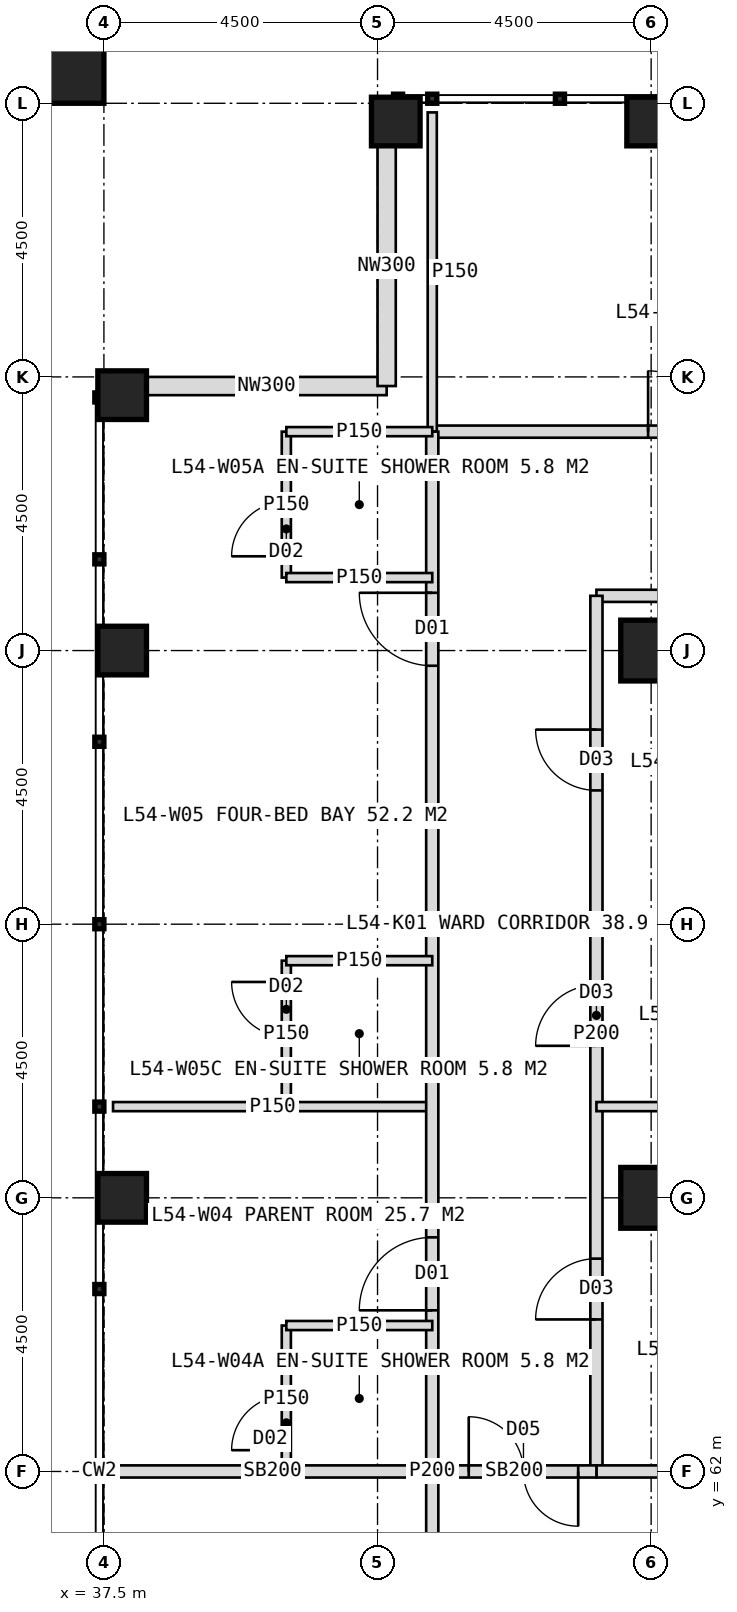
"""IFC4 building model, lengths in metres.
Left out: names, types, materials, properties, quantities, classifications, styles, units other than length and angle.
Written with IfcOpenShell. Run it as: python <this file> out.ifc"""

import sys

from ifc_helpers import new_model, si_unit, direction, frame, frame_2d, origin, origin_2d, place, context, subcontext, project, spatial, rectangle, hollow_rectangle, extrude, element, fill, save


model = new_model("IFC4")
c1 = context("Model", 3, precision=1e-05, world=origin(), true_north=direction((0.0, 1.0)))
c2 = subcontext(c1, "Body", "Model", "MODEL_VIEW")
j1 = project(units=[si_unit("LENGTHUNIT", "METRE"), si_unit("PLANEANGLEUNIT", "RADIAN")], contexts=[c1])
p1 = place(None, origin())
s1 = spatial("IfcSite", under=j1, at=p1, CompositionType="ELEMENT")
p2 = place(p1, origin())
s2 = spatial("IfcBuilding", under=s1, at=p2, CompositionType="ELEMENT")
p3 = place(p2, frame((0.0, 0.0, 225.0)))
s3 = spatial("IfcBuildingStorey", under=s2, at=p3, CompositionType="ELEMENT", Elevation=225.0)
for number, where, z_axis, x_axis in (
    (1, (46.5, 75.5, 0.0), (0.0, 0.0, 1.0), (1.0, 0.0, 0.0)),
    (2, (46.5, 66.5, 0.0), (0.0, 0.0, 1.0), (1.0, 0.0, 0.0)),
):
    element("IfcColumn", number, at=place(p3, frame(where, z_axis=z_axis, x_axis=x_axis)), inside=s3, PredefinedType="COLUMN", context=c2, shape_type="SweptSolid", body=[
        extrude(hollow_rectangle(XDim=1.0, YDim=1.0, WallThickness=0.1, at=origin_2d()), origin(), (0.0, 0.0, 1.0), 4.0),
    ])
for number, where, z_axis, x_axis in (
    (3, (42.3, 84.2, 0.0), (0.0, 0.0, 1.0), (1.0, 0.0, 0.0)),
    (4, (46.5, 84.2, 0.0), (0.0, 0.0, 1.0), (1.0, 0.0, 0.0)),
    (5, (37.8, 66.5, 0.0), (0.0, 0.0, 1.0), (1.0, 0.0, 0.0)),
    (6, (37.8, 75.5, 0.0), (0.0, 0.0, 1.0), (1.0, 0.0, 0.0)),
    (7, (37.8, 79.7, 0.0), (0.0, 0.0, 1.0), (1.0, 0.0, 0.0)),
):
    element("IfcColumn", number, at=place(p3, frame(where, z_axis=z_axis, x_axis=x_axis)), inside=s3, PredefinedType="COLUMN", context=c2, shape_type="SweptSolid", body=[
        extrude(hollow_rectangle(XDim=0.8, YDim=0.8, WallThickness=0.08, at=origin_2d()), origin(), (0.0, 0.0, 1.0), 4.0),
    ])
p4 = place(p3, frame((36.9, 85.1, 0.0), z_axis=(0.0, 0.0, 1.0), x_axis=(1.0, 0.0, 0.0)))
e8 = element("IfcColumn", 8, at=p4, inside=s3, PredefinedType="COLUMN", context=c2, shape_type="SweptSolid", body=[
    extrude(hollow_rectangle(XDim=1.2, YDim=1.2, WallThickness=0.07, at=origin_2d()), origin(), (0.0, 0.0, 1.0), 4.0),
])
for number, where, z_axis, x_axis in (
    (9, (38.2, 79.85, 0.0), (0.0, 0.0, 1.0), (1.0, 0.0, 0.0)),
    (10, (42.15, 79.85, 0.0), (0.0, 0.0, 1.0), (0.0, 1.0, 0.0)),
):
    element("IfcWall", number, at=place(p3, frame(where, z_axis=z_axis, x_axis=x_axis)), inside=s3, PredefinedType="ELEMENTEDWALL", context=c2, shape_type="SweptSolid", body=[
        extrude(rectangle(XDim=3.95, YDim=0.3, at=frame_2d((1.975, 0.0))), origin(), (0.0, 0.0, 1.0), 2.85),
    ])
p5 = place(p3, frame((42.9, 79.1, 0.0), z_axis=(0.0, 0.0, 1.0), x_axis=(1.0, 0.0, 0.0)))
e11 = element("IfcWall", 11, at=p5, inside=s3, PredefinedType="PARTITIONING", context=c2, shape_type="SweptSolid", body=[
    extrude(rectangle(XDim=34.2, YDim=0.2, at=frame_2d((17.1, 0.0))), origin(), (0.0, 0.0, 1.0), 3.75),
])
p6 = place(p5, frame((3.55, 0.0, 0.0)))
e12 = element("IfcOpeningElement", 12, at=p6, cuts=e11, PredefinedType="OPENING", context=c2, shape_type="SweptSolid", body=[
    extrude(rectangle(XDim=1.0, YDim=2.1, at=frame_2d((0.5, 1.05))), frame((0.0, 0.11, 0.0), z_axis=(0.0, -1.0, 0.0), x_axis=(1.0, 0.0, 0.0)), (0.0, 0.0, 1.0), 0.22),
])
p7 = place(p5, frame((10.75, 0.0, 0.0)))
e13 = element("IfcOpeningElement", 13, at=p7, cuts=e11, PredefinedType="OPENING", context=c2, shape_type="SweptSolid", body=[
    extrude(rectangle(XDim=1.2, YDim=2.2, at=frame_2d((0.6, 1.1))), frame((0.0, 0.11, 0.0), z_axis=(0.0, -1.0, 0.0), x_axis=(1.0, 0.0, 0.0)), (0.0, 0.0, 1.0), 0.22),
])
p8 = place(p5, frame((16.25, 0.0, 0.0)))
e14 = element("IfcOpeningElement", 14, at=p8, cuts=e11, PredefinedType="OPENING", context=c2, shape_type="SweptSolid", body=[
    extrude(rectangle(XDim=1.2, YDim=2.2, at=frame_2d((0.6, 1.1))), frame((0.0, 0.11, 0.0), z_axis=(0.0, -1.0, 0.0), x_axis=(1.0, 0.0, 0.0)), (0.0, 0.0, 1.0), 0.22),
])
p9 = place(p5, frame((22.75, 0.0, 0.0)))
e15 = element("IfcOpeningElement", 15, at=p9, cuts=e11, PredefinedType="OPENING", context=c2, shape_type="SweptSolid", body=[
    extrude(rectangle(XDim=1.2, YDim=2.2, at=frame_2d((0.6, 1.1))), frame((0.0, 0.11, 0.0), z_axis=(0.0, -1.0, 0.0), x_axis=(1.0, 0.0, 0.0)), (0.0, 0.0, 1.0), 0.22),
])
p10 = place(p5, frame((29.75, 0.0, 0.0)))
e16 = element("IfcOpeningElement", 16, at=p10, cuts=e11, PredefinedType="OPENING", context=c2, shape_type="SweptSolid", body=[
    extrude(rectangle(XDim=1.2, YDim=2.2, at=frame_2d((0.6, 1.1))), frame((0.0, 0.11, 0.0), z_axis=(0.0, -1.0, 0.0), x_axis=(1.0, 0.0, 0.0)), (0.0, 0.0, 1.0), 0.22),
])
p11 = place(p3, frame((42.9, 79.1, 0.0), z_axis=(0.0, 0.0, 1.0), x_axis=(0.0, 1.0, 0.0)))
e17 = element("IfcWall", 17, at=p11, inside=s3, PredefinedType="PARTITIONING", context=c2, shape_type="SweptSolid", body=[
    extrude(rectangle(XDim=5.25, YDim=0.15, at=frame_2d((2.625, 0.0))), origin(), (0.0, 0.0, 1.0), 3.75),
])
p12 = place(p3, frame((45.6, 76.4, 0.0), z_axis=(0.0, 0.0, 1.0), x_axis=(1.0, 0.0, 0.0)))
e18 = element("IfcWall", 18, at=p12, inside=s3, PredefinedType="PARTITIONING", context=c2, shape_type="SweptSolid", body=[
    extrude(rectangle(XDim=5.4, YDim=0.2, at=frame_2d((2.7, 0.0))), origin(), (0.0, 0.0, 1.0), 3.75),
])
p13 = place(p3, frame((42.9, 62.0, 0.0), z_axis=(0.0, 0.0, 1.0), x_axis=(-1.0, 0.0, 0.0)))
e19 = element("IfcWall", 19, at=p13, inside=s3, PredefinedType="SOLIDWALL", context=c2, shape_type="SweptSolid", body=[
    extrude(rectangle(XDim=5.25, YDim=0.2, at=frame_2d((2.625, 0.0))), origin(), (0.0, 0.0, 1.0), 2.95),
])
p14 = place(p3, frame((42.9, 68.0, 0.0), z_axis=(0.0, 0.0, 1.0), x_axis=(-1.0, 0.0, 0.0)))
e20 = element("IfcWall", 20, at=p14, inside=s3, PredefinedType="PARTITIONING", context=c2, shape_type="SweptSolid", body=[
    extrude(rectangle(XDim=5.25, YDim=0.15, at=frame_2d((2.625, 0.0))), origin(), (0.0, 0.0, 1.0), 3.75),
])
p15 = place(p3, frame((42.9, 44.9, 0.0), z_axis=(0.0, 0.0, 1.0), x_axis=(0.0, 1.0, 0.0)))
e21 = element("IfcWall", 21, at=p15, inside=s3, PredefinedType="PARTITIONING", context=c2, shape_type="SweptSolid", body=[
    extrude(rectangle(XDim=34.2, YDim=0.2, at=frame_2d((17.1, 0.0))), origin(), (0.0, 0.0, 1.0), 3.75),
])
p16 = place(p15, frame((1.25, 0.0, 0.0)))
e22 = element("IfcOpeningElement", 22, at=p16, cuts=e21, PredefinedType="OPENING", context=c2, shape_type="SweptSolid", body=[
    extrude(rectangle(XDim=1.2, YDim=2.2, at=frame_2d((0.6, 1.1))), frame((0.0, 0.11, 0.0), z_axis=(0.0, -1.0, 0.0), x_axis=(1.0, 0.0, 0.0)), (0.0, 0.0, 1.0), 0.22),
])
p17 = place(p15, frame((7.75, 0.0, 0.0)))
e23 = element("IfcOpeningElement", 23, at=p17, cuts=e21, PredefinedType="OPENING", context=c2, shape_type="SweptSolid", body=[
    extrude(rectangle(XDim=1.2, YDim=2.2, at=frame_2d((0.6, 1.1))), frame((0.0, 0.11, 0.0), z_axis=(0.0, -1.0, 0.0), x_axis=(1.0, 0.0, 0.0)), (0.0, 0.0, 1.0), 0.22),
])
p18 = place(p15, frame((13.6, 0.0, 0.0)))
e24 = element("IfcOpeningElement", 24, at=p18, cuts=e21, PredefinedType="OPENING", context=c2, shape_type="SweptSolid", body=[
    extrude(rectangle(XDim=1.0, YDim=2.1, at=frame_2d((0.5, 1.05))), frame((0.0, 0.11, 0.0), z_axis=(0.0, -1.0, 0.0), x_axis=(1.0, 0.0, 0.0)), (0.0, 0.0, 1.0), 0.22),
])
p19 = place(p15, frame((19.75, 0.0, 0.0)))
e25 = element("IfcOpeningElement", 25, at=p19, cuts=e21, PredefinedType="OPENING", context=c2, shape_type="SweptSolid", body=[
    extrude(rectangle(XDim=1.2, YDim=2.2, at=frame_2d((0.6, 1.1))), frame((0.0, 0.11, 0.0), z_axis=(0.0, -1.0, 0.0), x_axis=(1.0, 0.0, 0.0)), (0.0, 0.0, 1.0), 0.22),
])
p20 = place(p15, frame((30.35, 0.0, 0.0)))
e26 = element("IfcOpeningElement", 26, at=p20, cuts=e21, PredefinedType="OPENING", context=c2, shape_type="SweptSolid", body=[
    extrude(rectangle(XDim=1.2, YDim=2.2, at=frame_2d((0.6, 1.1))), frame((0.0, 0.11, 0.0), z_axis=(0.0, -1.0, 0.0), x_axis=(1.0, 0.0, 0.0)), (0.0, 0.0, 1.0), 0.22),
])
p21 = place(p3, frame((40.5, 62.0, 0.0), z_axis=(0.0, 0.0, 1.0), x_axis=(0.0, 1.0, 0.0)))
e27 = element("IfcWall", 27, at=p21, inside=s3, PredefinedType="PARTITIONING", context=c2, shape_type="SweptSolid", body=[
    extrude(rectangle(XDim=2.4, YDim=0.15, at=frame_2d((1.2, 0.0))), origin(), (0.0, 0.0, 1.0), 3.75),
])
p22 = place(p21, frame((0.35, 0.0, 0.0)))
e28 = element("IfcOpeningElement", 28, at=p22, cuts=e27, PredefinedType="OPENING", context=c2, shape_type="SweptSolid", body=[
    extrude(rectangle(XDim=0.9, YDim=2.1, at=frame_2d((0.45, 1.05))), frame((0.0, 0.085, 0.0), z_axis=(0.0, -1.0, 0.0), x_axis=(1.0, 0.0, 0.0)), (0.0, 0.0, 1.0), 0.17),
])
p23 = place(p3, frame((42.9, 64.4, 0.0), z_axis=(0.0, 0.0, 1.0), x_axis=(-1.0, 0.0, 0.0)))
e29 = element("IfcWall", 29, at=p23, inside=s3, PredefinedType="PARTITIONING", context=c2, shape_type="SweptSolid", body=[
    extrude(rectangle(XDim=2.4, YDim=0.15, at=frame_2d((1.2, 0.0))), origin(), (0.0, 0.0, 1.0), 3.75),
])
p24 = place(p3, frame((40.5, 76.7, 0.0), z_axis=(0.0, 0.0, 1.0), x_axis=(0.0, 1.0, 0.0)))
e30 = element("IfcWall", 30, at=p24, inside=s3, PredefinedType="PARTITIONING", context=c2, shape_type="SweptSolid", body=[
    extrude(rectangle(XDim=2.4, YDim=0.15, at=frame_2d((1.2, 0.0))), origin(), (0.0, 0.0, 1.0), 3.75),
])
p25 = place(p24, frame((0.35, 0.0, 0.0)))
e31 = element("IfcOpeningElement", 31, at=p25, cuts=e30, PredefinedType="OPENING", context=c2, shape_type="SweptSolid", body=[
    extrude(rectangle(XDim=0.9, YDim=2.1, at=frame_2d((0.45, 1.05))), frame((0.0, 0.085, 0.0), z_axis=(0.0, -1.0, 0.0), x_axis=(1.0, 0.0, 0.0)), (0.0, 0.0, 1.0), 0.17),
])
p26 = place(p3, frame((42.9, 76.7, 0.0), z_axis=(0.0, 0.0, 1.0), x_axis=(-1.0, 0.0, 0.0)))
e32 = element("IfcWall", 32, at=p26, inside=s3, PredefinedType="PARTITIONING", context=c2, shape_type="SweptSolid", body=[
    extrude(rectangle(XDim=2.4, YDim=0.15, at=frame_2d((1.2, 0.0))), origin(), (0.0, 0.0, 1.0), 3.75),
])
p27 = place(p3, frame((40.5, 68.0, 0.0), z_axis=(0.0, 0.0, 1.0), x_axis=(0.0, 1.0, 0.0)))
e33 = element("IfcWall", 33, at=p27, inside=s3, PredefinedType="PARTITIONING", context=c2, shape_type="SweptSolid", body=[
    extrude(rectangle(XDim=2.4, YDim=0.15, at=frame_2d((1.2, 0.0))), origin(), (0.0, 0.0, 1.0), 3.75),
])
p28 = place(p27, frame((1.15, 0.0, 0.0)))
e34 = element("IfcOpeningElement", 34, at=p28, cuts=e33, PredefinedType="OPENING", context=c2, shape_type="SweptSolid", body=[
    extrude(rectangle(XDim=0.9, YDim=2.1, at=frame_2d((0.45, 1.05))), frame((0.0, 0.085, 0.0), z_axis=(0.0, -1.0, 0.0), x_axis=(1.0, 0.0, 0.0)), (0.0, 0.0, 1.0), 0.17),
])
for number, where, z_axis, x_axis in (
    (35, (42.9, 70.4, 0.0), (0.0, 0.0, 1.0), (-1.0, 0.0, 0.0)),
    (36, (42.9, 79.1, 0.0), (0.0, 0.0, 1.0), (-1.0, 0.0, 0.0)),
):
    element("IfcWall", number, at=place(p3, frame(where, z_axis=z_axis, x_axis=x_axis)), inside=s3, PredefinedType="PARTITIONING", context=c2, shape_type="SweptSolid", body=[
        extrude(rectangle(XDim=2.4, YDim=0.15, at=frame_2d((1.2, 0.0))), origin(), (0.0, 0.0, 1.0), 3.75),
    ])
p29 = place(p3, frame((45.6, 62.0, 0.0), z_axis=(0.0, 0.0, 1.0), x_axis=(0.0, 1.0, 0.0)))
e37 = element("IfcWall", 37, at=p29, inside=s3, PredefinedType="PARTITIONING", context=c2, shape_type="SweptSolid", body=[
    extrude(rectangle(XDim=14.4, YDim=0.2, at=frame_2d((7.2, 0.0))), origin(), (0.0, 0.0, 1.0), 3.75),
])
p30 = place(p29, frame((2.5, 0.0, 0.0)))
e38 = element("IfcOpeningElement", 38, at=p30, cuts=e37, PredefinedType="OPENING", context=c2, shape_type="SweptSolid", body=[
    extrude(rectangle(XDim=1.0, YDim=2.1, at=frame_2d((0.5, 1.05))), frame((0.0, 0.11, 0.0), z_axis=(0.0, -1.0, 0.0), x_axis=(1.0, 0.0, 0.0)), (0.0, 0.0, 1.0), 0.22),
])
p31 = place(p29, frame((7.0, 0.0, 0.0)))
e39 = element("IfcOpeningElement", 39, at=p31, cuts=e37, PredefinedType="OPENING", context=c2, shape_type="SweptSolid", body=[
    extrude(rectangle(XDim=1.0, YDim=2.1, at=frame_2d((0.5, 1.05))), frame((0.0, 0.11, 0.0), z_axis=(0.0, -1.0, 0.0), x_axis=(1.0, 0.0, 0.0)), (0.0, 0.0, 1.0), 0.22),
])
p32 = place(p29, frame((11.2, 0.0, 0.0)))
e40 = element("IfcOpeningElement", 40, at=p32, cuts=e37, PredefinedType="OPENING", context=c2, shape_type="SweptSolid", body=[
    extrude(rectangle(XDim=1.0, YDim=2.1, at=frame_2d((0.5, 1.05))), frame((0.0, 0.11, 0.0), z_axis=(0.0, -1.0, 0.0), x_axis=(1.0, 0.0, 0.0)), (0.0, 0.0, 1.0), 0.22),
])
p33 = place(p3, frame((51.0, 62.0, 0.0), z_axis=(0.0, 0.0, 1.0), x_axis=(-1.0, 0.0, 0.0)))
e41 = element("IfcWall", 41, at=p33, inside=s3, PredefinedType="SOLIDWALL", context=c2, shape_type="SweptSolid", body=[
    extrude(rectangle(XDim=5.4, YDim=0.2, at=frame_2d((2.7, 0.0))), origin(), (0.0, 0.0, 1.0), 2.95),
])
for number, where, z_axis, x_axis in (
    (42, (51.0, 68.0, 0.0), (0.0, 0.0, 1.0), (-1.0, 0.0, 0.0)),
    (43, (51.0, 71.0, 0.0), (0.0, 0.0, 1.0), (-1.0, 0.0, 0.0)),
):
    element("IfcWall", number, at=place(p3, frame(where, z_axis=z_axis, x_axis=x_axis)), inside=s3, PredefinedType="PARTITIONING", context=c2, shape_type="SweptSolid", body=[
        extrude(rectangle(XDim=5.4, YDim=0.15, at=frame_2d((2.7, 0.0))), origin(), (0.0, 0.0, 1.0), 3.75),
    ])
p34 = place(p3, frame((45.6, 62.0, 0.0), z_axis=(0.0, 0.0, 1.0), x_axis=(-1.0, 0.0, 0.0)))
e44 = element("IfcWall", 44, at=p34, inside=s3, PredefinedType="SOLIDWALL", context=c2, shape_type="SweptSolid", body=[
    extrude(rectangle(XDim=2.7, YDim=0.2, at=frame_2d((1.35, 0.0))), origin(), (0.0, 0.0, 1.0), 2.95),
])
p35 = place(p34, frame((0.3, 0.0, 0.0)))
e45 = element("IfcOpeningElement", 45, at=p35, cuts=e44, PredefinedType="OPENING", context=c2, shape_type="SweptSolid", body=[
    extrude(rectangle(XDim=1.8, YDim=2.2, at=frame_2d((0.9, 1.1))), frame((0.0, 0.11, 0.0), z_axis=(0.0, -1.0, 0.0), x_axis=(1.0, 0.0, 0.0)), (0.0, 0.0, 1.0), 0.22),
])
p36 = place(p6, origin())
e46 = element("IfcDoor", 46, at=p36, inside=s3, OperationType="SINGLE_SWING_LEFT", PredefinedType="DOOR", context=c2, shape_type="SweptSolid", body=[
    extrude(rectangle(XDim=1.0, YDim=2.1, at=frame_2d((0.5, 1.05))), frame((0.0, 0.025, 0.0), z_axis=(0.0, -1.0, 0.0), x_axis=(1.0, 0.0, 0.0)), (0.0, 0.0, 1.0), 0.05),
])
fill(e12, e46)
p37 = place(p19, origin())
e47 = element("IfcDoor", 47, at=p37, inside=s3, OperationType="SINGLE_SWING_LEFT", PredefinedType="DOOR", context=c2, shape_type="SweptSolid", body=[
    extrude(rectangle(XDim=1.2, YDim=2.2, at=frame_2d((0.6, 1.1))), frame((0.0, 0.025, 0.0), z_axis=(0.0, -1.0, 0.0), x_axis=(1.0, 0.0, 0.0)), (0.0, 0.0, 1.0), 0.05),
])
fill(e25, e47)
p38 = place(p22, origin())
e48 = element("IfcDoor", 48, at=p38, inside=s3, OperationType="SINGLE_SWING_LEFT", PredefinedType="DOOR", context=c2, shape_type="SweptSolid", body=[
    extrude(rectangle(XDim=0.9, YDim=2.1, at=frame_2d((0.45, 1.05))), frame((0.0, 0.025, 0.0), z_axis=(0.0, -1.0, 0.0), x_axis=(1.0, 0.0, 0.0)), (0.0, 0.0, 1.0), 0.05),
])
fill(e28, e48)
p39 = place(p20, origin())
e49 = element("IfcDoor", 49, at=p39, inside=s3, OperationType="SINGLE_SWING_RIGHT", PredefinedType="DOOR", context=c2, shape_type="SweptSolid", body=[
    extrude(rectangle(XDim=1.2, YDim=2.2, at=frame_2d((0.6, 1.1))), frame((0.0, 0.025, 0.0), z_axis=(0.0, -1.0, 0.0), x_axis=(1.0, 0.0, 0.0)), (0.0, 0.0, 1.0), 0.05),
])
fill(e26, e49)
p40 = place(p25, origin())
e50 = element("IfcDoor", 50, at=p40, inside=s3, OperationType="SINGLE_SWING_LEFT", PredefinedType="DOOR", context=c2, shape_type="SweptSolid", body=[
    extrude(rectangle(XDim=0.9, YDim=2.1, at=frame_2d((0.45, 1.05))), frame((0.0, 0.025, 0.0), z_axis=(0.0, -1.0, 0.0), x_axis=(1.0, 0.0, 0.0)), (0.0, 0.0, 1.0), 0.05),
])
fill(e31, e50)
p41 = place(p28, origin())
e51 = element("IfcDoor", 51, at=p41, inside=s3, OperationType="SINGLE_SWING_RIGHT", PredefinedType="DOOR", context=c2, shape_type="SweptSolid", body=[
    extrude(rectangle(XDim=0.9, YDim=2.1, at=frame_2d((0.45, 1.05))), frame((0.0, 0.025, 0.0), z_axis=(0.0, -1.0, 0.0), x_axis=(1.0, 0.0, 0.0)), (0.0, 0.0, 1.0), 0.05),
])
fill(e34, e51)
p42 = place(p30, origin())
e52 = element("IfcDoor", 52, at=p42, inside=s3, OperationType="SINGLE_SWING_LEFT", PredefinedType="DOOR", context=c2, shape_type="SweptSolid", body=[
    extrude(rectangle(XDim=1.0, YDim=2.1, at=frame_2d((0.5, 1.05))), frame((0.0, 0.025, 0.0), z_axis=(0.0, -1.0, 0.0), x_axis=(1.0, 0.0, 0.0)), (0.0, 0.0, 1.0), 0.05),
])
fill(e38, e52)
p43 = place(p31, origin())
e53 = element("IfcDoor", 53, at=p43, inside=s3, OperationType="SINGLE_SWING_LEFT", PredefinedType="DOOR", context=c2, shape_type="SweptSolid", body=[
    extrude(rectangle(XDim=1.0, YDim=2.1, at=frame_2d((0.5, 1.05))), frame((0.0, 0.025, 0.0), z_axis=(0.0, -1.0, 0.0), x_axis=(1.0, 0.0, 0.0)), (0.0, 0.0, 1.0), 0.05),
])
fill(e39, e53)
p44 = place(p32, origin())
e54 = element("IfcDoor", 54, at=p44, inside=s3, OperationType="SINGLE_SWING_RIGHT", PredefinedType="DOOR", context=c2, shape_type="SweptSolid", body=[
    extrude(rectangle(XDim=1.0, YDim=2.1, at=frame_2d((0.5, 1.05))), frame((0.0, 0.025, 0.0), z_axis=(0.0, -1.0, 0.0), x_axis=(1.0, 0.0, 0.0)), (0.0, 0.0, 1.0), 0.05),
])
fill(e40, e54)
p45 = place(p35, origin())
e55 = element("IfcDoor", 55, at=p45, inside=s3, OperationType="DOUBLE_DOOR_DOUBLE_SWING", PredefinedType="DOOR", context=c2, shape_type="SweptSolid", body=[
    extrude(rectangle(XDim=1.8, YDim=2.2, at=frame_2d((0.9, 1.1))), frame((0.0, 0.025, 0.0), z_axis=(0.0, -1.0, 0.0), x_axis=(1.0, 0.0, 0.0)), (0.0, 0.0, 1.0), 0.05),
])
fill(e45, e55)
save(model, sys.argv[1])
